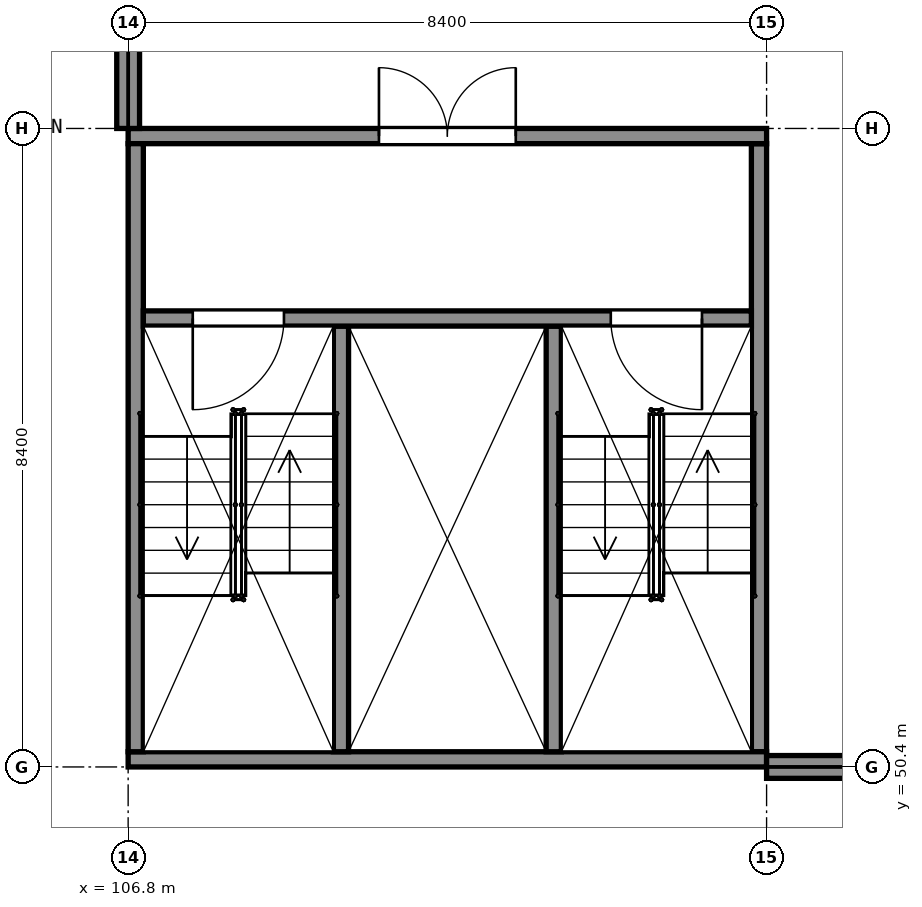
"""IFC4 building model, lengths in metres.
Left out: names, types, materials, properties, quantities, classifications, styles, units other than length and angle.
Written with IfcOpenShell. Run it as: python <this file> out.ifc"""

import sys

from ifc_helpers import new_model, si_unit, direction, frame, frame_2d, origin, place, context, subcontext, project, spatial, rectangle, extrude, element, fill, save


model = new_model("IFC4")
c1 = context("Model", 3, precision=1e-05, world=origin(), true_north=direction((0.0, 1.0)))
c2 = subcontext(c1, "Body", "Model", "MODEL_VIEW")
j1 = project(units=[si_unit("LENGTHUNIT", "METRE"), si_unit("PLANEANGLEUNIT", "RADIAN")], contexts=[c1])
p1 = place(None, origin())
s1 = spatial("IfcSite", under=j1, at=p1, CompositionType="ELEMENT")
p2 = place(p1, origin())
s2 = spatial("IfcBuilding", under=s1, at=p2, CompositionType="ELEMENT")
p3 = place(p2, frame((0.0, 0.0, 10.5)))
s3 = spatial("IfcBuildingStorey", under=s2, at=p3, CompositionType="ELEMENT", Elevation=10.5)
p4 = place(p3, frame((106.8, 50.5, 0.0), z_axis=(0.0, 0.0, 1.0), x_axis=(1.0, 0.0, 0.0)))
e1 = element("IfcWall", 1, at=p4, inside=s3, PredefinedType="SHEAR", context=c2, shape_type="SweptSolid", body=[
    extrude(rectangle(XDim=8.4, YDim=0.2, at=frame_2d((4.2, 0.0))), origin(), (0.0, 0.0, 1.0), 9.5),
])
p5 = place(p3, frame((106.8, 58.7, 0.0), z_axis=(0.0, 0.0, 1.0), x_axis=(1.0, 0.0, 0.0)))
e2 = element("IfcWall", 2, at=p5, inside=s3, PredefinedType="SHEAR", context=c2, shape_type="SweptSolid", body=[
    extrude(rectangle(XDim=8.4, YDim=0.2, at=frame_2d((4.2, 0.0))), origin(), (0.0, 0.0, 1.0), 9.5),
])
p6 = place(p5, frame((3.3, 0.0, 0.0)))
e3 = element("IfcOpeningElement", 3, at=p6, cuts=e2, PredefinedType="OPENING", context=c2, shape_type="SweptSolid", body=[
    extrude(rectangle(XDim=1.8, YDim=2.1, at=frame_2d((0.9, 1.05))), frame((0.0, 0.11, 0.0), z_axis=(0.0, -1.0, 0.0), x_axis=(1.0, 0.0, 0.0)), (0.0, 0.0, 1.0), 0.22),
])
for number, where, z_axis, x_axis in (
    (4, (106.9, 50.6, 0.0), (0.0, 0.0, 1.0), (0.0, 1.0, 0.0)),
    (5, (115.1, 50.6, 0.0), (0.0, 0.0, 1.0), (0.0, 1.0, 0.0)),
):
    element("IfcWall", number, at=place(p3, frame(where, z_axis=z_axis, x_axis=x_axis)), inside=s3, PredefinedType="SHEAR", context=c2, shape_type="SweptSolid", body=[
        extrude(rectangle(XDim=8.0, YDim=0.2, at=frame_2d((4.0, 0.0))), origin(), (0.0, 0.0, 1.0), 9.5),
    ])
p7 = place(p3, frame((107.0, 56.3, 0.0), z_axis=(0.0, 0.0, 1.0), x_axis=(1.0, 0.0, 0.0)))
e6 = element("IfcWall", 6, at=p7, inside=s3, PredefinedType="SHEAR", context=c2, shape_type="SweptSolid", body=[
    extrude(rectangle(XDim=8.0, YDim=0.2, at=frame_2d((4.0, 0.0))), origin(), (0.0, 0.0, 1.0), 9.5),
])
p8 = place(p7, frame((0.65, 0.0, 0.0)))
e7 = element("IfcOpeningElement", 7, at=p8, cuts=e6, PredefinedType="OPENING", context=c2, shape_type="SweptSolid", body=[
    extrude(rectangle(XDim=1.2, YDim=2.1, at=frame_2d((0.6, 1.05))), frame((0.0, 0.11, 0.0), z_axis=(0.0, -1.0, 0.0), x_axis=(1.0, 0.0, 0.0)), (0.0, 0.0, 1.0), 0.22),
])
p9 = place(p7, frame((6.15, 0.0, 0.0)))
e8 = element("IfcOpeningElement", 8, at=p9, cuts=e6, PredefinedType="OPENING", context=c2, shape_type="SweptSolid", body=[
    extrude(rectangle(XDim=1.2, YDim=2.1, at=frame_2d((0.6, 1.05))), frame((0.0, 0.11, 0.0), z_axis=(0.0, -1.0, 0.0), x_axis=(1.0, 0.0, 0.0)), (0.0, 0.0, 1.0), 0.22),
])
for number, where, z_axis, x_axis in (
    (9, (109.6, 50.6, 0.0), (0.0, 0.0, 1.0), (0.0, 1.0, 0.0)),
    (10, (112.4, 50.6, 0.0), (0.0, 0.0, 1.0), (0.0, 1.0, 0.0)),
):
    element("IfcWall", number, at=place(p3, frame(where, z_axis=z_axis, x_axis=x_axis)), inside=s3, PredefinedType="SHEAR", context=c2, shape_type="SweptSolid", body=[
        extrude(rectangle(XDim=5.6, YDim=0.2, at=frame_2d((2.8, 0.0))), origin(), (0.0, 0.0, 1.0), 9.5),
    ])
p10 = place(p3, frame((115.2, 50.4, 0.0), z_axis=(0.0, 0.0, 1.0), x_axis=(1.0, 0.0, 0.0)))
e11 = element("IfcWall", 11, at=p10, inside=s3, PredefinedType="SOLIDWALL", context=c2, shape_type="SweptSolid", body=[
    extrude(rectangle(XDim=8.05, YDim=0.3, at=frame_2d((4.025, 0.0))), origin(), (0.0, 0.0, 1.0), 8.44),
])
p11 = place(p10, frame((2.325, 0.0, 1.5)))
e12 = element("IfcOpeningElement", 12, at=p11, cuts=e11, PredefinedType="OPENING", context=c2, shape_type="SweptSolid", body=[
    extrude(rectangle(XDim=0.6, YDim=6.0, at=frame_2d((0.3, 3.0))), frame((0.0, 0.16, 0.0), z_axis=(0.0, -1.0, 0.0), x_axis=(1.0, 0.0, 0.0)), (0.0, 0.0, 1.0), 0.32),
])
p12 = place(p10, frame((5.125, 0.0, 1.5)))
e13 = element("IfcOpeningElement", 13, at=p12, cuts=e11, PredefinedType="OPENING", context=c2, shape_type="SweptSolid", body=[
    extrude(rectangle(XDim=0.6, YDim=6.0, at=frame_2d((0.3, 3.0))), frame((0.0, 0.16, 0.0), z_axis=(0.0, -1.0, 0.0), x_axis=(1.0, 0.0, 0.0)), (0.0, 0.0, 1.0), 0.32),
])
p13 = place(p3, frame((106.8, 58.8, 0.0), z_axis=(0.0, 0.0, 1.0), x_axis=(0.0, 1.0, 0.0)))
e14 = element("IfcWall", 14, at=p13, inside=s3, PredefinedType="SOLIDWALL", context=c2, shape_type="SweptSolid", body=[
    extrude(rectangle(XDim=8.4, YDim=0.3, at=frame_2d((4.2, 0.0))), origin(), (0.0, 0.0, 1.0), 8.44),
])
p14 = place(p13, frame((2.5, 0.0, 1.5)))
e15 = element("IfcOpeningElement", 15, at=p14, cuts=e14, PredefinedType="OPENING", context=c2, shape_type="SweptSolid", body=[
    extrude(rectangle(XDim=0.6, YDim=6.0, at=frame_2d((0.3, 3.0))), frame((0.0, 0.16, 0.0), z_axis=(0.0, -1.0, 0.0), x_axis=(1.0, 0.0, 0.0)), (0.0, 0.0, 1.0), 0.32),
])
p15 = place(p13, frame((5.3, 0.0, 1.5)))
e16 = element("IfcOpeningElement", 16, at=p15, cuts=e14, PredefinedType="OPENING", context=c2, shape_type="SweptSolid", body=[
    extrude(rectangle(XDim=0.6, YDim=6.0, at=frame_2d((0.3, 3.0))), frame((0.0, 0.16, 0.0), z_axis=(0.0, -1.0, 0.0), x_axis=(1.0, 0.0, 0.0)), (0.0, 0.0, 1.0), 0.32),
])
p16 = place(p6, origin())
e17 = element("IfcDoor", 17, at=p16, inside=s3, OperationType="DOUBLE_DOOR_SINGLE_SWING", PredefinedType="DOOR", context=c2, shape_type="SweptSolid", body=[
    extrude(rectangle(XDim=1.8, YDim=2.1, at=frame_2d((0.9, 1.05))), frame((0.0, 0.025, 0.0), z_axis=(0.0, -1.0, 0.0), x_axis=(1.0, 0.0, 0.0)), (0.0, 0.0, 1.0), 0.05),
])
fill(e3, e17)
p17 = place(p8, origin())
e18 = element("IfcDoor", 18, at=p17, inside=s3, OperationType="SINGLE_SWING_LEFT", PredefinedType="DOOR", context=c2, shape_type="SweptSolid", body=[
    extrude(rectangle(XDim=1.2, YDim=2.1, at=frame_2d((0.6, 1.05))), frame((0.0, 0.025, 0.0), z_axis=(0.0, -1.0, 0.0), x_axis=(1.0, 0.0, 0.0)), (0.0, 0.0, 1.0), 0.05),
])
fill(e7, e18)
p18 = place(p9, origin())
e19 = element("IfcDoor", 19, at=p18, inside=s3, OperationType="SINGLE_SWING_RIGHT", PredefinedType="DOOR", context=c2, shape_type="SweptSolid", body=[
    extrude(rectangle(XDim=1.2, YDim=2.1, at=frame_2d((0.6, 1.05))), frame((0.0, 0.025, 0.0), z_axis=(0.0, -1.0, 0.0), x_axis=(1.0, 0.0, 0.0)), (0.0, 0.0, 1.0), 0.05),
])
fill(e8, e19)
save(model, sys.argv[1])
